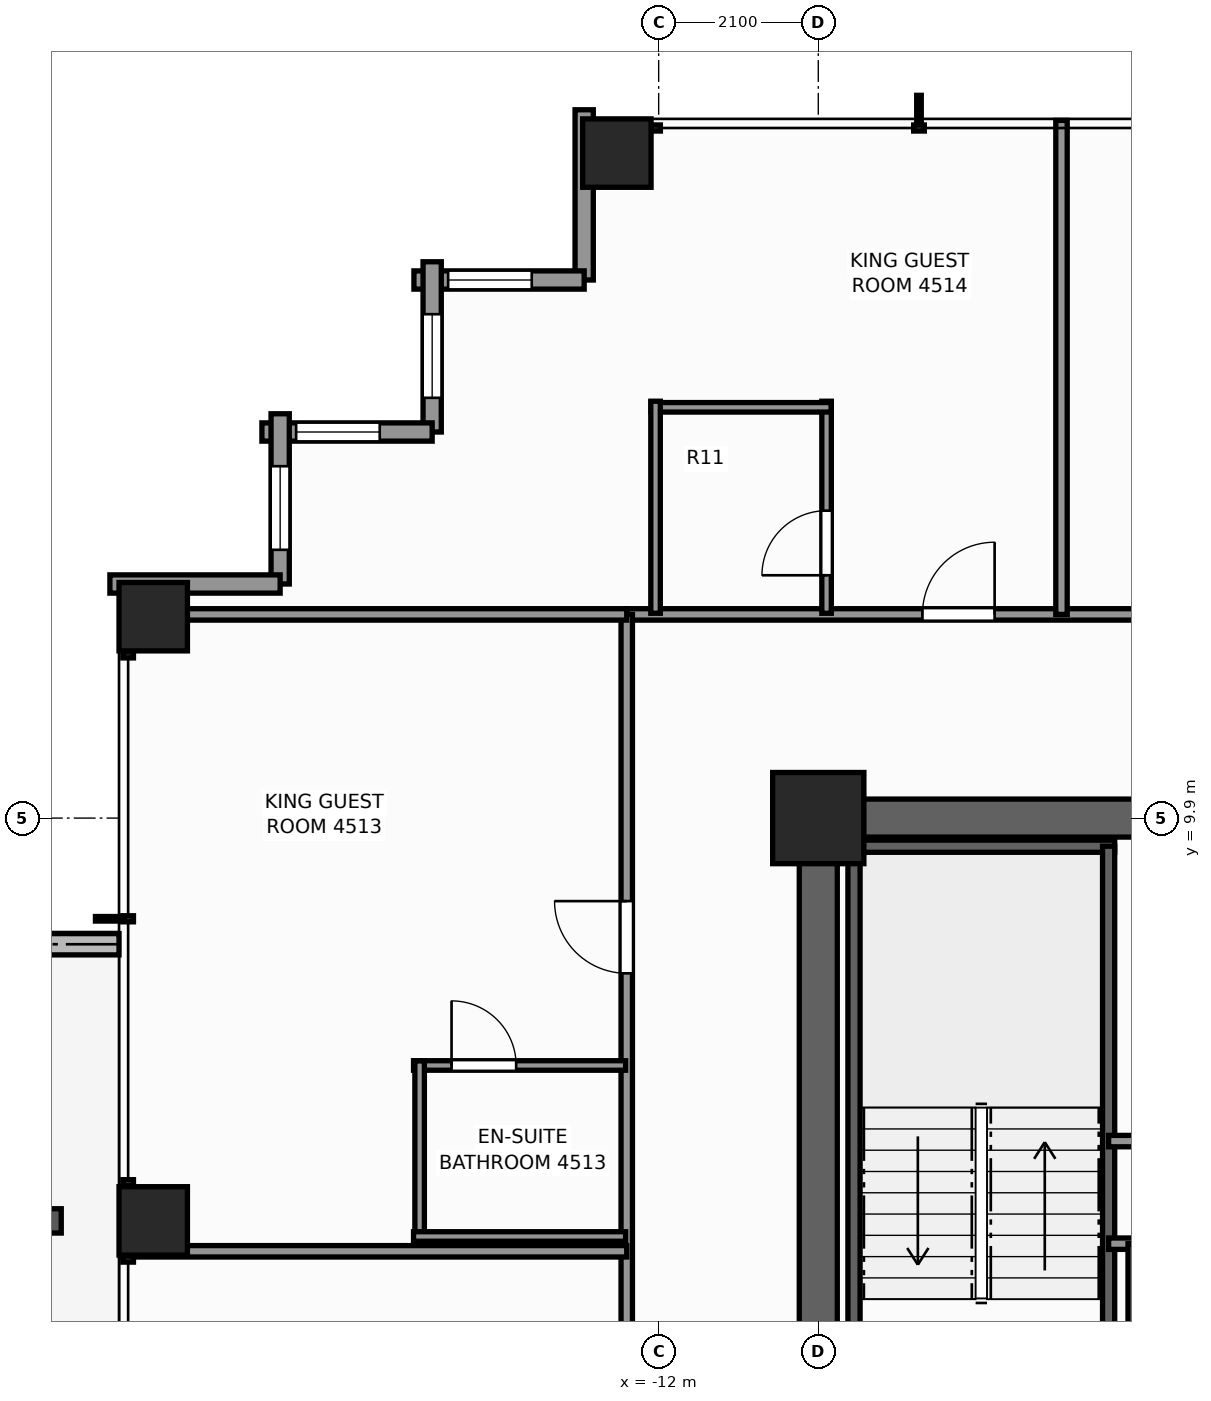
"""IFC4 building model, lengths in metres.
Left out: names, types, materials, properties, quantities, classifications, styles, units other than length and angle.
Written with IfcOpenShell. Run it as: python <this file> out.ifc"""

import sys

from ifc_helpers import new_model, si_unit, direction, frame, frame_2d, origin, origin_2d, place, context, subcontext, project, spatial, rectangle, extrude, element, fill, save


model = new_model("IFC4")
c1 = context("Model", 3, precision=1e-05, world=origin(), true_north=direction((0.0, 1.0)))
c2 = subcontext(c1, "Body", "Model", "MODEL_VIEW")
j1 = project(units=[si_unit("LENGTHUNIT", "METRE"), si_unit("PLANEANGLEUNIT", "RADIAN")], contexts=[c1])
p1 = place(None, origin())
s1 = spatial("IfcSite", under=j1, at=p1, CompositionType="ELEMENT")
p2 = place(p1, origin())
s2 = spatial("IfcBuilding", under=s1, at=p2, CompositionType="ELEMENT")
p3 = place(p2, frame((0.0, 0.0, 156.9)))
s3 = spatial("IfcBuildingStorey", under=s2, at=p3, CompositionType="ELEMENT", Elevation=156.9)
p4 = place(p3, frame((-10.15, 9.9, 0.0), z_axis=(0.0, 0.0, 1.0), x_axis=(1.0, 0.0, 0.0)))
e1 = element("IfcWall", 1, at=p4, inside=s3, PredefinedType="SHEAR", context=c2, shape_type="SweptSolid", body=[
    extrude(rectangle(XDim=14.57, YDim=0.5, at=frame_2d((7.285, 0.0))), origin(), (0.0, 0.0, 1.0), 3.3),
])
p5 = place(p3, frame((-9.9, -3.7, 0.0), z_axis=(0.0, 0.0, 1.0), x_axis=(0.0, 1.0, 0.0)))
e2 = element("IfcWall", 2, at=p5, inside=s3, PredefinedType="SHEAR", context=c2, shape_type="SweptSolid", body=[
    extrude(rectangle(XDim=13.35, YDim=0.5, at=frame_2d((6.675, 0.0))), origin(), (0.0, 0.0, 1.0), 3.3),
])
p6 = place(p5, frame((0.35, 0.0, 0.0)))
e3 = element("IfcOpeningElement", 3, at=p6, cuts=e2, PredefinedType="OPENING", context=c2, shape_type="SweptSolid", body=[
    extrude(rectangle(XDim=1.1, YDim=2.2, at=frame_2d((0.55, 1.1))), frame((0.0, 0.26, 0.0), z_axis=(0.0, -1.0, 0.0), x_axis=(1.0, 0.0, 0.0)), (0.0, 0.0, 1.0), 0.52),
])
p7 = place(p3, frame((-9.9, 9.9, 0.0), z_axis=(0.0, 0.0, 1.0), x_axis=(1.0, 0.0, 0.0)))
e4 = element("IfcColumn", 4, at=p7, inside=s3, PredefinedType="COLUMN", context=c2, shape_type="SweptSolid", body=[
    extrude(rectangle(XDim=1.2, YDim=1.2, at=origin_2d()), origin(), (0.0, 0.0, 1.0), 3.3),
])
for number, where, z_axis, x_axis in (
    (5, (-12.55, 18.65, 0.0), (0.0, 0.0, 1.0), (1.0, 0.0, 0.0)),
    (6, (-18.65, 4.6, 0.0), (0.0, 0.0, 1.0), (1.0, 0.0, 0.0)),
    (7, (-18.65, 12.55, 0.0), (0.0, 0.0, 1.0), (1.0, 0.0, 0.0)),
):
    element("IfcColumn", number, at=place(p3, frame(where, z_axis=z_axis, x_axis=x_axis)), inside=s3, PredefinedType="COLUMN", context=c2, shape_type="SweptSolid", body=[
        extrude(rectangle(XDim=0.9, YDim=0.9, at=origin_2d()), origin(), (0.0, 0.0, 1.0), 3.3),
    ])
p8 = place(p3, frame((-19.1, 8.24, -0.02), z_axis=(0.0, 0.0, 1.0), x_axis=(-1.0, 0.0, 0.0)))
e8 = element("IfcWall", 8, at=p8, inside=s3, PredefinedType="PARAPET", context=c2, shape_type="SweptSolid", body=[
    extrude(rectangle(XDim=2.006, YDim=0.28, at=frame_2d((1.003, 0.0))), origin(), (0.0, 0.0, 1.0), 0.42),
])
p9 = place(p3, frame((-12.98, 16.98, 0.0), z_axis=(0.0, 0.0, 1.0), x_axis=(0.0, 1.0, 0.0)))
e9 = element("IfcWall", 9, at=p9, inside=s3, PredefinedType="STANDARD", context=c2, shape_type="SweptSolid", body=[
    extrude(rectangle(XDim=2.24, YDim=0.24, at=frame_2d((1.12, 0.0))), origin(), (0.0, 0.0, 1.0), 2.483),
])
p10 = place(p3, frame((-15.22, 16.98, 0.0), z_axis=(0.0, 0.0, 1.0), x_axis=(1.0, 0.0, 0.0)))
e10 = element("IfcWall", 10, at=p10, inside=s3, PredefinedType="STANDARD", context=c2, shape_type="SweptSolid", body=[
    extrude(rectangle(XDim=2.24, YDim=0.24, at=frame_2d((1.12, 0.0))), origin(), (0.0, 0.0, 1.0), 2.483),
])
p11 = place(p10, frame((0.45, 0.0, 0.65)))
e11 = element("IfcOpeningElement", 11, at=p11, cuts=e10, PredefinedType="OPENING", context=c2, shape_type="SweptSolid", body=[
    extrude(rectangle(XDim=1.1, YDim=1.45, at=frame_2d((0.55, 0.725))), frame((0.0, 0.13, 0.0), z_axis=(0.0, -1.0, 0.0), x_axis=(1.0, 0.0, 0.0)), (0.0, 0.0, 1.0), 0.26),
])
p12 = place(p3, frame((-14.98, 14.98, 0.0), z_axis=(0.0, 0.0, 1.0), x_axis=(0.0, 1.0, 0.0)))
e12 = element("IfcWall", 12, at=p12, inside=s3, PredefinedType="STANDARD", context=c2, shape_type="SweptSolid", body=[
    extrude(rectangle(XDim=2.24, YDim=0.24, at=frame_2d((1.12, 0.0))), origin(), (0.0, 0.0, 1.0), 2.483),
])
p13 = place(p12, frame((0.45, 0.0, 0.65)))
e13 = element("IfcOpeningElement", 13, at=p13, cuts=e12, PredefinedType="OPENING", context=c2, shape_type="SweptSolid", body=[
    extrude(rectangle(XDim=1.1, YDim=1.45, at=frame_2d((0.55, 0.725))), frame((0.0, 0.13, 0.0), z_axis=(0.0, -1.0, 0.0), x_axis=(1.0, 0.0, 0.0)), (0.0, 0.0, 1.0), 0.26),
])
p14 = place(p3, frame((-17.22, 14.98, 0.0), z_axis=(0.0, 0.0, 1.0), x_axis=(1.0, 0.0, 0.0)))
e14 = element("IfcWall", 14, at=p14, inside=s3, PredefinedType="STANDARD", context=c2, shape_type="SweptSolid", body=[
    extrude(rectangle(XDim=2.24, YDim=0.24, at=frame_2d((1.12, 0.0))), origin(), (0.0, 0.0, 1.0), 2.483),
])
p15 = place(p14, frame((0.45, 0.0, 0.65)))
e15 = element("IfcOpeningElement", 15, at=p15, cuts=e14, PredefinedType="OPENING", context=c2, shape_type="SweptSolid", body=[
    extrude(rectangle(XDim=1.1, YDim=1.45, at=frame_2d((0.55, 0.725))), frame((0.0, 0.13, 0.0), z_axis=(0.0, -1.0, 0.0), x_axis=(1.0, 0.0, 0.0)), (0.0, 0.0, 1.0), 0.26),
])
p16 = place(p3, frame((-16.98, 12.98, 0.0), z_axis=(0.0, 0.0, 1.0), x_axis=(0.0, 1.0, 0.0)))
e16 = element("IfcWall", 16, at=p16, inside=s3, PredefinedType="STANDARD", context=c2, shape_type="SweptSolid", body=[
    extrude(rectangle(XDim=2.24, YDim=0.24, at=frame_2d((1.12, 0.0))), origin(), (0.0, 0.0, 1.0), 2.483),
])
p17 = place(p16, frame((0.45, 0.0, 0.65)))
e17 = element("IfcOpeningElement", 17, at=p17, cuts=e16, PredefinedType="OPENING", context=c2, shape_type="SweptSolid", body=[
    extrude(rectangle(XDim=1.1, YDim=1.45, at=frame_2d((0.55, 0.725))), frame((0.0, 0.13, 0.0), z_axis=(0.0, -1.0, 0.0), x_axis=(1.0, 0.0, 0.0)), (0.0, 0.0, 1.0), 0.26),
])
p18 = place(p3, frame((-19.22, 12.98, 0.0), z_axis=(0.0, 0.0, 1.0), x_axis=(1.0, 0.0, 0.0)))
e18 = element("IfcWall", 18, at=p18, inside=s3, PredefinedType="STANDARD", context=c2, shape_type="SweptSolid", body=[
    extrude(rectangle(XDim=2.24, YDim=0.24, at=frame_2d((1.12, 0.0))), origin(), (0.0, 0.0, 1.0), 2.483),
])
p19 = place(p3, frame((-9.52, 9.53, 0.0), z_axis=(0.0, 0.0, 1.0), x_axis=(1.0, 0.0, 0.0)))
e19 = element("IfcWall", 19, at=p19, inside=s3, PredefinedType="SHEAR", context=c2, shape_type="SweptSolid", body=[
    extrude(rectangle(XDim=3.52, YDim=0.16, at=frame_2d((1.76, 0.0))), origin(), (0.0, 0.0, 1.0), 3.3),
])
for number, where, z_axis, x_axis in (
    (20, (-9.43, 1.97, 0.0), (0.0, 0.0, 1.0), (0.0, 1.0, 0.0)),
    (21, (-6.08, 1.97, 0.0), (0.0, 0.0, 1.0), (0.0, 1.0, 0.0)),
):
    element("IfcWall", number, at=place(p3, frame(where, z_axis=z_axis, x_axis=x_axis)), inside=s3, PredefinedType="SHEAR", context=c2, shape_type="SweptSolid", body=[
        extrude(rectangle(XDim=7.56, YDim=0.16, at=frame_2d((3.78, 0.0))), origin(), (0.0, 0.0, 1.0), 3.3),
    ])
p20 = place(p3, frame((-6.08, 4.3, 0.0), z_axis=(0.0, 0.0, 1.0), x_axis=(1.0, 0.0, 0.0)))
e22 = element("IfcWall", 22, at=p20, inside=s3, PredefinedType="PARTITIONING", context=c2, shape_type="SweptSolid", body=[
    extrude(rectangle(XDim=6.3, YDim=0.15, at=frame_2d((3.15, 0.0))), origin(), (0.0, 0.0, 1.0), 3.1),
])
p21 = place(p3, frame((-6.08, 5.65, 0.0), z_axis=(0.0, 0.0, 1.0), x_axis=(1.0, 0.0, 0.0)))
e23 = element("IfcWall", 23, at=p21, inside=s3, PredefinedType="PARTITIONING", context=c2, shape_type="SweptSolid", body=[
    extrude(rectangle(XDim=4.43, YDim=0.15, at=frame_2d((2.215, 0.0))), origin(), (0.0, 0.0, 1.0), 3.1),
])
p22 = place(p3, frame((-5.75, 1.97, 0.0), z_axis=(0.0, 0.0, 1.0), x_axis=(0.0, 1.0, 0.0)))
e24 = element("IfcWall", 24, at=p22, inside=s3, PredefinedType="PARTITIONING", context=c2, shape_type="SweptSolid", body=[
    extrude(rectangle(XDim=2.33, YDim=0.15, at=frame_2d((1.165, 0.0))), origin(), (0.0, 0.0, 1.0), 2.735),
])
p23 = place(p3, frame((-12.42, 12.58, 0.0), z_axis=(0.0, 0.0, 1.0), x_axis=(1.0, 0.0, 0.0)))
e25 = element("IfcWall", 25, at=p23, inside=s3, PredefinedType="PARTITIONING", context=c2, shape_type="SweptSolid", body=[
    extrude(rectangle(XDim=24.84, YDim=0.15, at=frame_2d((12.42, 0.0))), origin(), (0.0, 0.0, 1.0), 2.389),
])
p24 = place(p23, frame((3.89, 0.0, 0.0)))
e26 = element("IfcOpeningElement", 26, at=p24, cuts=e25, PredefinedType="OPENING", context=c2, shape_type="SweptSolid", body=[
    extrude(rectangle(XDim=0.95, YDim=2.06, at=frame_2d((0.475, 1.03))), frame((0.0, 0.085, 0.0), z_axis=(0.0, -1.0, 0.0), x_axis=(1.0, 0.0, 0.0)), (0.0, 0.0, 1.0), 0.17),
])
p25 = place(p23, frame((8.806, 0.0, 0.0)))
e27 = element("IfcOpeningElement", 27, at=p25, cuts=e25, PredefinedType="OPENING", context=c2, shape_type="SweptSolid", body=[
    extrude(rectangle(XDim=0.9, YDim=2.06, at=frame_2d((0.45, 1.03))), frame((0.0, 0.085, 0.0), z_axis=(0.0, -1.0, 0.0), x_axis=(1.0, 0.0, 0.0)), (0.0, 0.0, 1.0), 0.17),
])
p26 = place(p23, frame((13.724, 0.0, 0.0)))
e28 = element("IfcOpeningElement", 28, at=p26, cuts=e25, PredefinedType="OPENING", context=c2, shape_type="SweptSolid", body=[
    extrude(rectangle(XDim=0.95, YDim=2.06, at=frame_2d((0.475, 1.03))), frame((0.0, 0.085, 0.0), z_axis=(0.0, -1.0, 0.0), x_axis=(1.0, 0.0, 0.0)), (0.0, 0.0, 1.0), 0.17),
])
p27 = place(p23, frame((16.886, 0.0, 0.0)))
e29 = element("IfcOpeningElement", 29, at=p27, cuts=e25, PredefinedType="OPENING", context=c2, shape_type="SweptSolid", body=[
    extrude(rectangle(XDim=0.9, YDim=2.06, at=frame_2d((0.45, 1.03))), frame((0.0, 0.085, 0.0), z_axis=(0.0, -1.0, 0.0), x_axis=(1.0, 0.0, 0.0)), (0.0, 0.0, 1.0), 0.17),
])
p28 = place(p23, frame((20.0, 0.0, 0.0)))
e30 = element("IfcOpeningElement", 30, at=p28, cuts=e25, PredefinedType="OPENING", context=c2, shape_type="SweptSolid", body=[
    extrude(rectangle(XDim=0.95, YDim=2.06, at=frame_2d((0.475, 1.03))), frame((0.0, 0.085, 0.0), z_axis=(0.0, -1.0, 0.0), x_axis=(1.0, 0.0, 0.0)), (0.0, 0.0, 1.0), 0.17),
])
p29 = place(p3, frame((-12.42, -12.26, 0.0), z_axis=(0.0, 0.0, 1.0), x_axis=(0.0, 1.0, 0.0)))
e31 = element("IfcWall", 31, at=p29, inside=s3, PredefinedType="PARTITIONING", context=c2, shape_type="SweptSolid", body=[
    extrude(rectangle(XDim=24.84, YDim=0.15, at=frame_2d((12.42, 0.0))), origin(), (0.0, 0.0, 1.0), 2.389),
])
p30 = place(p29, frame((3.373, 0.0, 0.0)))
e32 = element("IfcOpeningElement", 32, at=p30, cuts=e31, PredefinedType="OPENING", context=c2, shape_type="SweptSolid", body=[
    extrude(rectangle(XDim=0.95, YDim=2.06, at=frame_2d((0.475, 1.03))), frame((0.0, 0.085, 0.0), z_axis=(0.0, -1.0, 0.0), x_axis=(1.0, 0.0, 0.0)), (0.0, 0.0, 1.0), 0.17),
])
p31 = place(p29, frame((8.959, 0.0, 0.0)))
e33 = element("IfcOpeningElement", 33, at=p31, cuts=e31, PredefinedType="OPENING", context=c2, shape_type="SweptSolid", body=[
    extrude(rectangle(XDim=0.95, YDim=2.06, at=frame_2d((0.475, 1.03))), frame((0.0, 0.085, 0.0), z_axis=(0.0, -1.0, 0.0), x_axis=(1.0, 0.0, 0.0)), (0.0, 0.0, 1.0), 0.17),
])
p32 = place(p29, frame((14.219, 0.0, 0.0)))
e34 = element("IfcOpeningElement", 34, at=p32, cuts=e31, PredefinedType="OPENING", context=c2, shape_type="SweptSolid", body=[
    extrude(rectangle(XDim=0.95, YDim=2.06, at=frame_2d((0.475, 1.03))), frame((0.0, 0.085, 0.0), z_axis=(0.0, -1.0, 0.0), x_axis=(1.0, 0.0, 0.0)), (0.0, 0.0, 1.0), 0.17),
])
p33 = place(p29, frame((20.117, 0.0, 0.0)))
e35 = element("IfcOpeningElement", 35, at=p33, cuts=e31, PredefinedType="OPENING", context=c2, shape_type="SweptSolid", body=[
    extrude(rectangle(XDim=0.95, YDim=2.06, at=frame_2d((0.475, 1.03))), frame((0.0, 0.085, 0.0), z_axis=(0.0, -1.0, 0.0), x_axis=(1.0, 0.0, 0.0)), (0.0, 0.0, 1.0), 0.17),
])
p34 = place(p3, frame((-19.08, 12.58, 0.0), z_axis=(0.0, 0.0, 1.0), x_axis=(1.0, 0.0, 0.0)))
e36 = element("IfcWall", 36, at=p34, inside=s3, PredefinedType="PARTITIONING", context=c2, shape_type="SweptSolid", body=[
    extrude(rectangle(XDim=6.66, YDim=0.15, at=frame_2d((3.33, 0.0))), origin(), (0.0, 0.0, 1.0), 2.389),
])
p35 = place(p3, frame((-19.08, 4.2, 0.0), z_axis=(0.0, 0.0, 1.0), x_axis=(1.0, 0.0, 0.0)))
e37 = element("IfcWall", 37, at=p35, inside=s3, PredefinedType="PARTITIONING", context=c2, shape_type="SweptSolid", body=[
    extrude(rectangle(XDim=6.66, YDim=0.15, at=frame_2d((3.33, 0.0))), origin(), (0.0, 0.0, 1.0), 2.473),
])
p36 = place(p3, frame((-15.225, 6.645, 0.0), z_axis=(0.0, 0.0, 1.0), x_axis=(1.0, 0.0, 0.0)))
e38 = element("IfcWall", 38, at=p36, inside=s3, PredefinedType="PARTITIONING", context=c2, shape_type="SweptSolid", body=[
    extrude(rectangle(XDim=2.79, YDim=0.125, at=frame_2d((1.395, 0.0))), origin(), (0.0, 0.0, 1.0), 3.1),
])
p37 = place(p36, frame((0.5, 0.0, 0.0)))
e39 = element("IfcOpeningElement", 39, at=p37, cuts=e38, PredefinedType="OPENING", context=c2, shape_type="SweptSolid", body=[
    extrude(rectangle(XDim=0.85, YDim=2.03, at=frame_2d((0.425, 1.015))), frame((0.0, 0.073, 0.0), z_axis=(0.0, -1.0, 0.0), x_axis=(1.0, 0.0, 0.0)), (0.0, 0.0, 1.0), 0.145),
])
p38 = place(p3, frame((-15.145, 4.335, 0.0), z_axis=(0.0, 0.0, 1.0), x_axis=(0.0, 1.0, 0.0)))
e40 = element("IfcWall", 40, at=p38, inside=s3, PredefinedType="PARTITIONING", context=c2, shape_type="SweptSolid", body=[
    extrude(rectangle(XDim=2.37, YDim=0.125, at=frame_2d((1.185, 0.0))), origin(), (0.0, 0.0, 1.0), 2.389),
])
p39 = place(p3, frame((-15.225, 4.395, 0.0), z_axis=(0.0, 0.0, 1.0), x_axis=(1.0, 0.0, 0.0)))
e41 = element("IfcWall", 41, at=p39, inside=s3, PredefinedType="PARTITIONING", context=c2, shape_type="SweptSolid", body=[
    extrude(rectangle(XDim=2.79, YDim=0.125, at=frame_2d((1.395, 0.0))), origin(), (0.0, 0.0, 1.0), 2.389),
])
p40 = place(p3, frame((-6.7, 12.58, 0.0), z_axis=(0.0, 0.0, 1.0), x_axis=(0.0, 1.0, 0.0)))
e42 = element("IfcWall", 42, at=p40, inside=s3, PredefinedType="PARTITIONING", context=c2, shape_type="SweptSolid", body=[
    extrude(rectangle(XDim=6.5, YDim=0.15, at=frame_2d((3.25, 0.0))), origin(), (0.0, 0.0, 1.0), 2.473),
])
p41 = place(p3, frame((-9.791, 12.595, 0.0), z_axis=(0.0, 0.0, 1.0), x_axis=(0.0, 1.0, 0.0)))
e43 = element("IfcWall", 43, at=p41, inside=s3, PredefinedType="PARTITIONING", context=c2, shape_type="SweptSolid", body=[
    extrude(rectangle(XDim=2.79, YDim=0.125, at=frame_2d((1.395, 0.0))), origin(), (0.0, 0.0, 1.0), 3.1),
])
p42 = place(p41, frame((0.5, 0.0, 0.0)))
e44 = element("IfcOpeningElement", 44, at=p42, cuts=e43, PredefinedType="OPENING", context=c2, shape_type="SweptSolid", body=[
    extrude(rectangle(XDim=0.85, YDim=2.03, at=frame_2d((0.425, 1.015))), frame((0.0, 0.073, 0.0), z_axis=(0.0, -1.0, 0.0), x_axis=(1.0, 0.0, 0.0)), (0.0, 0.0, 1.0), 0.145),
])
p43 = place(p3, frame((-12.101, 15.305, 0.0), z_axis=(0.0, 0.0, 1.0), x_axis=(1.0, 0.0, 0.0)))
e45 = element("IfcWall", 45, at=p43, inside=s3, PredefinedType="PARTITIONING", context=c2, shape_type="SweptSolid", body=[
    extrude(rectangle(XDim=2.37, YDim=0.125, at=frame_2d((1.185, 0.0))), origin(), (0.0, 0.0, 1.0), 2.389),
])
p44 = place(p3, frame((-12.041, 12.595, 0.0), z_axis=(0.0, 0.0, 1.0), x_axis=(0.0, 1.0, 0.0)))
e46 = element("IfcWall", 46, at=p44, inside=s3, PredefinedType="PARTITIONING", context=c2, shape_type="SweptSolid", body=[
    extrude(rectangle(XDim=2.79, YDim=0.125, at=frame_2d((1.395, 0.0))), origin(), (0.0, 0.0, 1.0), 3.1),
])
p45 = place(p11, origin())
e47 = element("IfcWindow", 47, at=p45, inside=s3, PartitioningType="SINGLE_PANEL", PredefinedType="WINDOW", context=c2, shape_type="SweptSolid", body=[
    extrude(rectangle(XDim=1.1, YDim=1.45, at=frame_2d((0.55, 0.725))), frame((0.0, 0.03, 0.0), z_axis=(0.0, -1.0, 0.0), x_axis=(1.0, 0.0, 0.0)), (0.0, 0.0, 1.0), 0.06),
])
fill(e11, e47)
p46 = place(p13, origin())
e48 = element("IfcWindow", 48, at=p46, inside=s3, PartitioningType="SINGLE_PANEL", PredefinedType="WINDOW", context=c2, shape_type="SweptSolid", body=[
    extrude(rectangle(XDim=1.1, YDim=1.45, at=frame_2d((0.55, 0.725))), frame((0.0, 0.03, 0.0), z_axis=(0.0, -1.0, 0.0), x_axis=(1.0, 0.0, 0.0)), (0.0, 0.0, 1.0), 0.06),
])
fill(e13, e48)
p47 = place(p15, origin())
e49 = element("IfcWindow", 49, at=p47, inside=s3, PartitioningType="SINGLE_PANEL", PredefinedType="WINDOW", context=c2, shape_type="SweptSolid", body=[
    extrude(rectangle(XDim=1.1, YDim=1.45, at=frame_2d((0.55, 0.725))), frame((0.0, 0.03, 0.0), z_axis=(0.0, -1.0, 0.0), x_axis=(1.0, 0.0, 0.0)), (0.0, 0.0, 1.0), 0.06),
])
fill(e15, e49)
p48 = place(p17, origin())
e50 = element("IfcWindow", 50, at=p48, inside=s3, PartitioningType="SINGLE_PANEL", PredefinedType="WINDOW", context=c2, shape_type="SweptSolid", body=[
    extrude(rectangle(XDim=1.1, YDim=1.45, at=frame_2d((0.55, 0.725))), frame((0.0, 0.03, 0.0), z_axis=(0.0, -1.0, 0.0), x_axis=(1.0, 0.0, 0.0)), (0.0, 0.0, 1.0), 0.06),
])
fill(e17, e50)
p49 = place(p37, origin())
e51 = element("IfcDoor", 51, at=p49, inside=s3, OperationType="SINGLE_SWING_LEFT", PredefinedType="DOOR", context=c2, shape_type="SweptSolid", body=[
    extrude(rectangle(XDim=0.85, YDim=2.03, at=frame_2d((0.425, 1.015))), frame((0.0, 0.025, 0.0), z_axis=(0.0, -1.0, 0.0), x_axis=(1.0, 0.0, 0.0)), (0.0, 0.0, 1.0), 0.05),
])
fill(e39, e51)
p50 = place(p33, origin())
e52 = element("IfcDoor", 52, at=p50, inside=s3, OperationType="SINGLE_SWING_RIGHT", PredefinedType="DOOR", context=c2, shape_type="SweptSolid", body=[
    extrude(rectangle(XDim=0.95, YDim=2.06, at=frame_2d((0.475, 1.03))), frame((0.0, 0.025, 0.0), z_axis=(0.0, -1.0, 0.0), x_axis=(1.0, 0.0, 0.0)), (0.0, 0.0, 1.0), 0.05),
])
fill(e35, e52)
p51 = place(p42, origin())
e53 = element("IfcDoor", 53, at=p51, inside=s3, OperationType="SINGLE_SWING_LEFT", PredefinedType="DOOR", context=c2, shape_type="SweptSolid", body=[
    extrude(rectangle(XDim=0.85, YDim=2.03, at=frame_2d((0.425, 1.015))), frame((0.0, 0.025, 0.0), z_axis=(0.0, -1.0, 0.0), x_axis=(1.0, 0.0, 0.0)), (0.0, 0.0, 1.0), 0.05),
])
fill(e44, e53)
p52 = place(p24, origin())
e54 = element("IfcDoor", 54, at=p52, inside=s3, OperationType="SINGLE_SWING_RIGHT", PredefinedType="DOOR", context=c2, shape_type="SweptSolid", body=[
    extrude(rectangle(XDim=0.95, YDim=2.06, at=frame_2d((0.475, 1.03))), frame((0.0, 0.025, 0.0), z_axis=(0.0, -1.0, 0.0), x_axis=(1.0, 0.0, 0.0)), (0.0, 0.0, 1.0), 0.05),
])
fill(e26, e54)
save(model, sys.argv[1])
